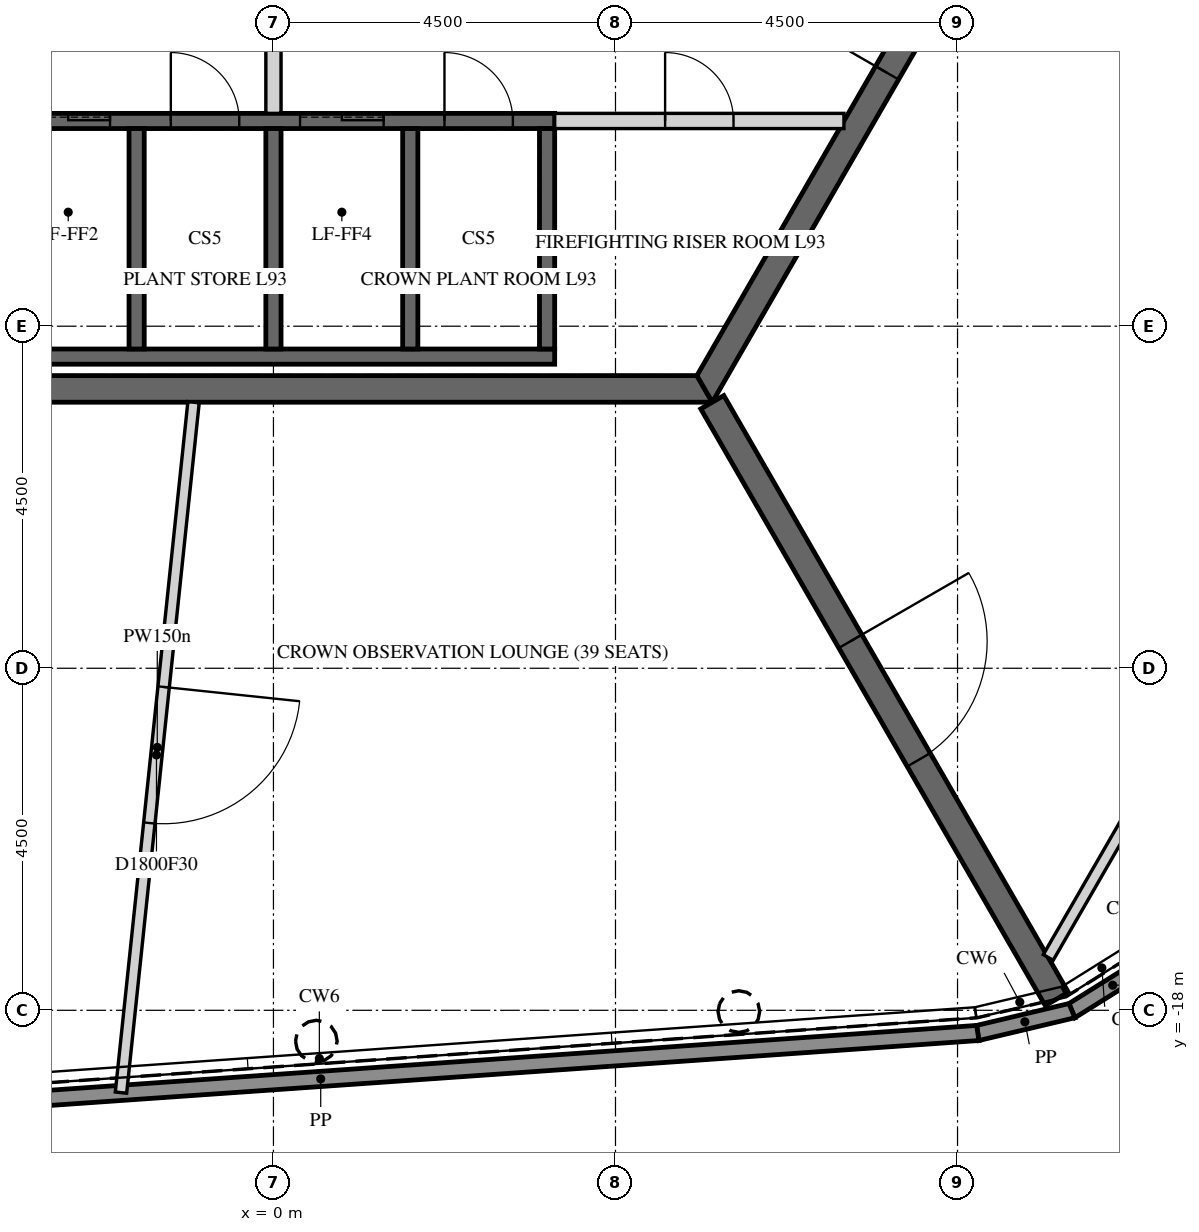
"""IFC4 building model, lengths in metres.
Left out: names, types, materials, properties, quantities, classifications, styles, units other than length and angle.
Written with IfcOpenShell. Run it as: python <this file> out.ifc"""

import sys

from ifc_helpers import new_model, si_unit, direction, frame, frame_2d, origin, place, context, subcontext, project, spatial, polyline, rectangle, outline, extrude, element, fill, save


model = new_model("IFC4")
c1 = context("Model", 3, precision=1e-05, world=origin(), true_north=direction((0.0, 1.0)))
c2 = subcontext(c1, "Body", "Model", "MODEL_VIEW")
j1 = project(units=[si_unit("LENGTHUNIT", "METRE"), si_unit("PLANEANGLEUNIT", "RADIAN")], contexts=[c1])
p1 = place(None, origin())
s1 = spatial("IfcSite", under=j1, at=p1, CompositionType="ELEMENT")
p2 = place(p1, origin())
s2 = spatial("IfcBuilding", under=s1, at=p2, CompositionType="ELEMENT")
p3 = place(p2, frame((0.0, 0.0, 392.7)))
s3 = spatial("IfcBuildingStorey", under=s2, at=p3, CompositionType="ELEMENT", Elevation=392.7)
p4 = place(p3, frame((11.577, -17.334, 4.5), z_axis=(0.0, 0.0, 1.0), x_axis=(-0.848052526064, -0.529912174834, 0.0)))
e1 = element("IfcWall", 1, at=p4, inside=s3, PredefinedType="PARAPET", context=c2, shape_type="SweptSolid", body=[
    extrude(outline(polyline([(0.016, -0.1), (1.248, -0.1), (1.281, 0.1), (-0.016, 0.1), (0.016, -0.1)])), origin(), (0.0, 0.0, 1.0), 1.1),
])
p5 = place(p3, frame((10.505, -18.005, 4.5), z_axis=(0.0, 0.0, 1.0), x_axis=(-0.97305877523, -0.230557194525, 0.0)))
e2 = element("IfcWall", 2, at=p5, inside=s3, PredefinedType="PARAPET", context=c2, shape_type="SweptSolid", body=[
    extrude(outline(polyline([(0.016, -0.1), (1.265, -0.1), (1.281, 0.1), (-0.016, 0.1), (0.016, -0.1)])), origin(), (0.0, 0.0, 1.0), 1.1),
])
p6 = place(p3, frame((9.266, -18.298, 4.5), z_axis=(0.0, 0.0, 1.0), x_axis=(-0.997563920068, -0.069758335553, 0.0)))
e3 = element("IfcWall", 3, at=p6, inside=s3, PredefinedType="PARAPET", context=c2, shape_type="SweptSolid", body=[
    extrude(outline(polyline([(0.008, -0.1), (17.322, -0.1), (17.34, 0.1), (-0.008, 0.1), (0.008, -0.1)])), origin(), (0.0, 0.0, 1.0), 1.1),
])
p7 = place(p3, frame((-5.673, -9.825, -0.2), z_axis=(0.0, 0.0, 1.0), x_axis=(1.0, 0.0, 0.0)))
e4 = element("IfcWall", 4, at=p7, inside=s3, PredefinedType="SHEAR", context=c2, shape_type="SweptSolid", body=[
    extrude(outline(polyline([(-0.101, -0.175), (11.446, -0.175), (11.244, 0.175), (0.101, 0.175), (-0.101, -0.175)])), origin(), (0.0, 0.0, 1.0), 4.5),
])
p8 = place(p3, frame((5.673, -9.825, -0.2), z_axis=(0.0, 0.0, 1.0), x_axis=(0.499995046907, 0.866028263435, 0.0)))
e5 = element("IfcWall", 5, at=p8, inside=s3, PredefinedType="SHEAR", context=c2, shape_type="SweptSolid", body=[
    extrude(outline(polyline([(-0.101, -0.175), (11.446, -0.175), (11.244, 0.175), (0.101, 0.175), (-0.101, -0.175)])), origin(), (0.0, 0.0, 1.0), 4.5),
])
p9 = place(p8, frame((4.801, 0.0, 0.2)))
e6 = element("IfcOpeningElement", 6, at=p9, cuts=e5, PredefinedType="OPENING", context=c2, shape_type="SweptSolid", body=[
    extrude(rectangle(XDim=1.8, YDim=2.4, at=frame_2d((0.9, 1.2))), frame((0.0, 0.185, 0.0), z_axis=(0.0, -1.0, 0.0), x_axis=(1.0, 0.0, 0.0)), (0.0, 0.0, 1.0), 0.37),
])
p10 = place(p3, frame((5.773, -10.0, -0.2), z_axis=(0.0, 0.0, 1.0), x_axis=(0.500006102154, -0.866021880676, 0.0)))
e7 = element("IfcWall", 7, at=p10, inside=s3, PredefinedType="SHEAR", context=c2, shape_type="SweptSolid", body=[
    extrude(rectangle(XDim=9.065, YDim=0.35, at=frame_2d((4.532, 0.0))), origin(), (0.0, 0.0, 1.0), 4.5),
])
p11 = place(p10, frame((3.632, 0.0, 0.2)))
e8 = element("IfcOpeningElement", 8, at=p11, cuts=e7, PredefinedType="OPENING", context=c2, shape_type="SweptSolid", body=[
    extrude(rectangle(XDim=1.8, YDim=2.4, at=frame_2d((0.9, 1.2))), frame((0.0, 0.185, 0.0), z_axis=(0.0, -1.0, 0.0), x_axis=(1.0, 0.0, 0.0)), (0.0, 0.0, 1.0), 0.37),
])
p12 = place(p3, frame((-5.5, -6.3, -0.2), z_axis=(0.0, 0.0, 1.0), x_axis=(1.0, 0.0, 0.0)))
e9 = element("IfcWall", 9, at=p12, inside=s3, PredefinedType="SHEAR", context=c2, shape_type="SweptSolid", body=[
    extrude(rectangle(XDim=9.2, YDim=0.2, at=frame_2d((4.6, 0.0))), origin(), (0.0, 0.0, 1.0), 4.5),
])
p13 = place(p12, frame((4.15, 0.0, 0.2)))
e10 = element("IfcOpeningElement", 10, at=p13, cuts=e9, PredefinedType="OPENING", context=c2, shape_type="SweptSolid", body=[
    extrude(rectangle(XDim=0.9, YDim=2.1, at=frame_2d((0.45, 1.05))), frame((0.0, 0.11, 0.0), z_axis=(0.0, -1.0, 0.0), x_axis=(1.0, 0.0, 0.0)), (0.0, 0.0, 1.0), 0.22),
])
p14 = place(p12, frame((7.75, 0.0, 0.2)))
e11 = element("IfcOpeningElement", 11, at=p14, cuts=e9, PredefinedType="OPENING", context=c2, shape_type="SweptSolid", body=[
    extrude(rectangle(XDim=0.9, YDim=2.1, at=frame_2d((0.45, 1.05))), frame((0.0, 0.11, 0.0), z_axis=(0.0, -1.0, 0.0), x_axis=(1.0, 0.0, 0.0)), (0.0, 0.0, 1.0), 0.22),
])
p15 = place(p12, frame((0.45, 0.0, 0.2)))
e12 = element("IfcOpeningElement", 12, at=p15, cuts=e9, PredefinedType="OPENING", context=c2, shape_type="SweptSolid", body=[
    extrude(rectangle(XDim=1.1, YDim=2.1, at=frame_2d((0.55, 1.05))), frame((0.0, 0.11, 0.0), z_axis=(0.0, -1.0, 0.0), x_axis=(1.0, 0.0, 0.0)), (0.0, 0.0, 1.0), 0.22),
])
p16 = place(p12, frame((2.25, 0.0, 0.2)))
e13 = element("IfcOpeningElement", 13, at=p16, cuts=e9, PredefinedType="OPENING", context=c2, shape_type="SweptSolid", body=[
    extrude(rectangle(XDim=1.1, YDim=2.1, at=frame_2d((0.55, 1.05))), frame((0.0, 0.11, 0.0), z_axis=(0.0, -1.0, 0.0), x_axis=(1.0, 0.0, 0.0)), (0.0, 0.0, 1.0), 0.22),
])
p17 = place(p12, frame((5.85, 0.0, 0.2)))
e14 = element("IfcOpeningElement", 14, at=p17, cuts=e9, PredefinedType="OPENING", context=c2, shape_type="SweptSolid", body=[
    extrude(rectangle(XDim=1.1, YDim=2.1, at=frame_2d((0.55, 1.05))), frame((0.0, 0.11, 0.0), z_axis=(0.0, -1.0, 0.0), x_axis=(1.0, 0.0, 0.0)), (0.0, 0.0, 1.0), 0.22),
])
p18 = place(p3, frame((-5.5, -9.4, -0.2), z_axis=(0.0, 0.0, 1.0), x_axis=(1.0, 0.0, 0.0)))
e15 = element("IfcWall", 15, at=p18, inside=s3, PredefinedType="SHEAR", context=c2, shape_type="SweptSolid", body=[
    extrude(rectangle(XDim=9.2, YDim=0.2, at=frame_2d((4.6, 0.0))), origin(), (0.0, 0.0, 1.0), 4.5),
])
for number, where, z_axis, x_axis in (
    (16, (-1.8, -9.3, -0.2), (0.0, 0.0, 1.0), (0.0, 1.0, 0.0)),
    (17, (0.0, -9.3, -0.2), (0.0, 0.0, 1.0), (0.0, 1.0, 0.0)),
    (18, (1.8, -9.3, -0.2), (0.0, 0.0, 1.0), (0.0, 1.0, 0.0)),
    (19, (3.6, -9.3, -0.2), (0.0, 0.0, 1.0), (0.0, 1.0, 0.0)),
):
    element("IfcWall", number, at=place(p3, frame(where, z_axis=z_axis, x_axis=x_axis)), inside=s3, PredefinedType="SHEAR", context=c2, shape_type="SweptSolid", body=[
        extrude(rectangle(XDim=2.9, YDim=0.2, at=frame_2d((1.45, 0.0))), origin(), (0.0, 0.0, 1.0), 4.5),
    ])
p19 = place(p3, frame((0.0, -6.2, 0.0), z_axis=(0.0, 0.0, 1.0), x_axis=(0.0, 1.0, 0.0)))
e20 = element("IfcWall", 20, at=p19, inside=s3, PredefinedType="PARTITIONING", context=c2, shape_type="SweptSolid", body=[
    extrude(rectangle(XDim=6.1, YDim=0.2, at=frame_2d((3.05, 0.0))), origin(), (0.0, 0.0, 1.0), 4.3),
])
p20 = place(p3, frame((3.7, -6.3, 0.0), z_axis=(0.0, 0.0, 1.0), x_axis=(1.0, 0.0, 0.0)))
e21 = element("IfcWall", 21, at=p20, inside=s3, PredefinedType="PARTITIONING", context=c2, shape_type="SweptSolid", body=[
    extrude(rectangle(XDim=3.806, YDim=0.2, at=frame_2d((1.903, 0.0))), origin(), (0.0, 0.0, 1.0), 4.3),
])
p21 = place(p20, frame((1.453, 0.0, 0.0)))
e22 = element("IfcOpeningElement", 22, at=p21, cuts=e21, PredefinedType="OPENING", context=c2, shape_type="SweptSolid", body=[
    extrude(rectangle(XDim=0.9, YDim=2.1, at=frame_2d((0.45, 1.05))), frame((0.0, 0.11, 0.0), z_axis=(0.0, -1.0, 0.0), x_axis=(1.0, 0.0, 0.0)), (0.0, 0.0, 1.0), 0.22),
])
p22 = place(p3, frame((-1.051, -10.0, 0.0), z_axis=(0.0, 0.0, 1.0), x_axis=(-0.104547024574, -0.994519944321, 0.0)))
e23 = element("IfcWall", 23, at=p22, inside=s3, PredefinedType="PARTITIONING", context=c2, shape_type="SweptSolid", body=[
    extrude(rectangle(XDim=9.133, YDim=0.15, at=frame_2d((4.566, 0.0))), origin(), (0.0, 0.0, 1.0), 4.3),
])
p23 = place(p22, frame((3.767, 0.0, 0.0)))
e24 = element("IfcOpeningElement", 24, at=p23, cuts=e23, PredefinedType="OPENING", context=c2, shape_type="SweptSolid", body=[
    extrude(rectangle(XDim=1.8, YDim=2.1, at=frame_2d((0.9, 1.05))), frame((0.0, 0.085, 0.0), z_axis=(0.0, -1.0, 0.0), x_axis=(1.0, 0.0, 0.0)), (0.0, 0.0, 1.0), 0.17),
])
p24 = place(p3, frame((16.996, -5.522, 0.0), z_axis=(0.0, 0.0, 1.0), x_axis=(-0.500004628935, -0.866022731251, 0.0)))
e25 = element("IfcWall", 25, at=p24, inside=s3, PredefinedType="PARTITIONING", context=c2, shape_type="SweptSolid", body=[
    extrude(rectangle(XDim=13.606, YDim=0.15, at=frame_2d((6.803, 0.0))), origin(), (0.0, 0.0, 1.0), 4.3),
])
p25 = place(p24, frame((6.303, 0.0, 0.0)))
e26 = element("IfcOpeningElement", 26, at=p25, cuts=e25, PredefinedType="OPENING", context=c2, shape_type="SweptSolid", body=[
    extrude(rectangle(XDim=1.0, YDim=2.1, at=frame_2d((0.5, 1.05))), frame((0.0, 0.085, 0.0), z_axis=(0.0, -1.0, 0.0), x_axis=(1.0, 0.0, 0.0)), (0.0, 0.0, 1.0), 0.17),
])
p26 = place(p9, origin())
e27 = element("IfcDoor", 27, at=p26, inside=s3, OperationType="DOUBLE_DOOR_SINGLE_SWING", PredefinedType="DOOR", context=c2, shape_type="SweptSolid", body=[
    extrude(rectangle(XDim=1.8, YDim=2.4, at=frame_2d((0.9, 1.2))), frame((0.0, 0.025, 0.0), z_axis=(0.0, -1.0, 0.0), x_axis=(1.0, 0.0, 0.0)), (0.0, 0.0, 1.0), 0.05),
])
fill(e6, e27)
p27 = place(p11, origin())
e28 = element("IfcDoor", 28, at=p27, inside=s3, OperationType="DOUBLE_DOOR_SINGLE_SWING", PredefinedType="DOOR", context=c2, shape_type="SweptSolid", body=[
    extrude(rectangle(XDim=1.8, YDim=2.4, at=frame_2d((0.9, 1.2))), frame((0.0, 0.025, 0.0), z_axis=(0.0, -1.0, 0.0), x_axis=(1.0, 0.0, 0.0)), (0.0, 0.0, 1.0), 0.05),
])
fill(e8, e28)
p28 = place(p21, origin())
e29 = element("IfcDoor", 29, at=p28, inside=s3, OperationType="SINGLE_SWING_LEFT", PredefinedType="DOOR", context=c2, shape_type="SweptSolid", body=[
    extrude(rectangle(XDim=0.9, YDim=2.1, at=frame_2d((0.45, 1.05))), frame((0.0, 0.025, 0.0), z_axis=(0.0, -1.0, 0.0), x_axis=(1.0, 0.0, 0.0)), (0.0, 0.0, 1.0), 0.05),
])
fill(e22, e29)
p29 = place(p13, origin())
e30 = element("IfcDoor", 30, at=p29, inside=s3, OperationType="SINGLE_SWING_LEFT", PredefinedType="DOOR", context=c2, shape_type="SweptSolid", body=[
    extrude(rectangle(XDim=0.9, YDim=2.1, at=frame_2d((0.45, 1.05))), frame((0.0, 0.025, 0.0), z_axis=(0.0, -1.0, 0.0), x_axis=(1.0, 0.0, 0.0)), (0.0, 0.0, 1.0), 0.05),
])
fill(e10, e30)
p30 = place(p14, origin())
e31 = element("IfcDoor", 31, at=p30, inside=s3, OperationType="SINGLE_SWING_LEFT", PredefinedType="DOOR", context=c2, shape_type="SweptSolid", body=[
    extrude(rectangle(XDim=0.9, YDim=2.1, at=frame_2d((0.45, 1.05))), frame((0.0, 0.025, 0.0), z_axis=(0.0, -1.0, 0.0), x_axis=(1.0, 0.0, 0.0)), (0.0, 0.0, 1.0), 0.05),
])
fill(e11, e31)
p31 = place(p16, origin())
e32 = element("IfcDoor", 32, at=p31, inside=s3, OperationType="SLIDING_TO_LEFT", PredefinedType="DOOR", context=c2, shape_type="SweptSolid", body=[
    extrude(rectangle(XDim=1.1, YDim=2.1, at=frame_2d((0.55, 1.05))), frame((0.0, 0.025, 0.0), z_axis=(0.0, -1.0, 0.0), x_axis=(1.0, 0.0, 0.0)), (0.0, 0.0, 1.0), 0.05),
])
fill(e13, e32)
p32 = place(p17, origin())
e33 = element("IfcDoor", 33, at=p32, inside=s3, OperationType="SLIDING_TO_LEFT", PredefinedType="DOOR", context=c2, shape_type="SweptSolid", body=[
    extrude(rectangle(XDim=1.1, YDim=2.1, at=frame_2d((0.55, 1.05))), frame((0.0, 0.025, 0.0), z_axis=(0.0, -1.0, 0.0), x_axis=(1.0, 0.0, 0.0)), (0.0, 0.0, 1.0), 0.05),
])
fill(e14, e33)
p33 = place(p23, origin())
e34 = element("IfcDoor", 34, at=p33, inside=s3, OperationType="DOUBLE_DOOR_SINGLE_SWING", PredefinedType="DOOR", context=c2, shape_type="SweptSolid", body=[
    extrude(rectangle(XDim=1.8, YDim=2.1, at=frame_2d((0.9, 1.05))), frame((0.0, 0.025, 0.0), z_axis=(0.0, -1.0, 0.0), x_axis=(1.0, 0.0, 0.0)), (0.0, 0.0, 1.0), 0.05),
])
fill(e24, e34)
save(model, sys.argv[1])
